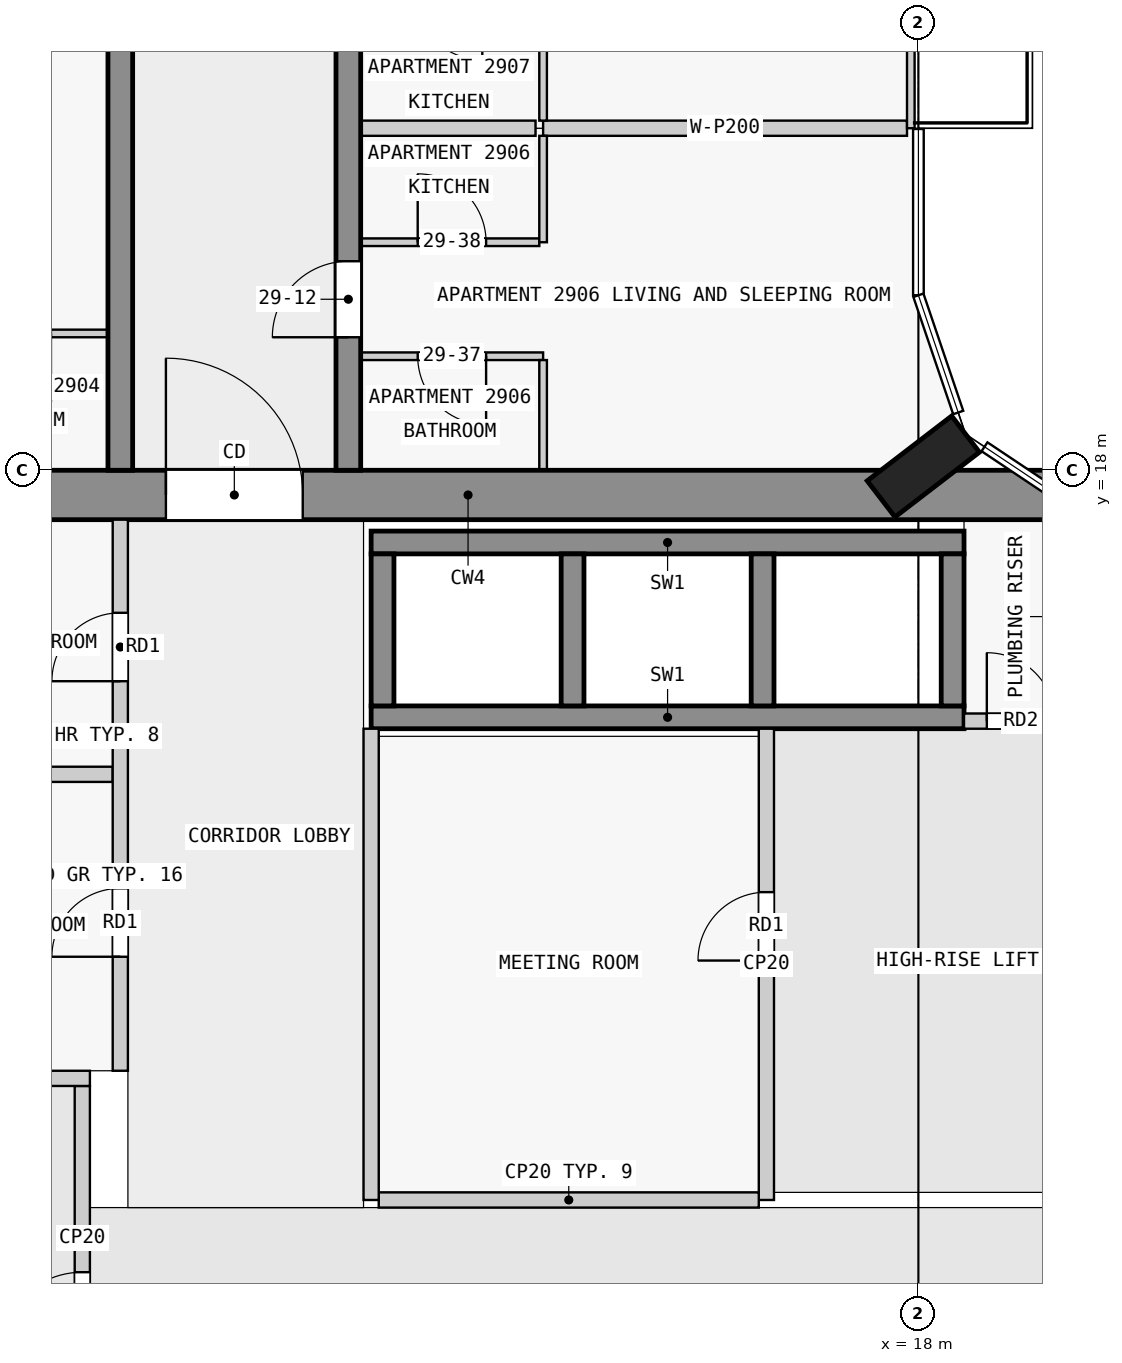
"""IFC4 building model, lengths in metres.
Left out: names, types, materials, properties, quantities, classifications, styles, units other than length and angle.
Written with IfcOpenShell. Run it as: python <this file> out.ifc"""

import sys

from ifc_helpers import new_model, si_unit, direction, frame, frame_2d, origin, origin_2d, place, context, subcontext, project, spatial, rectangle, extrude, element, fill, save


model = new_model("IFC4")
c1 = context("Model", 3, precision=1e-05, world=origin(), true_north=direction((0.0, 1.0)))
c2 = subcontext(c1, "Body", "Model", "MODEL_VIEW")
j1 = project(units=[si_unit("LENGTHUNIT", "METRE"), si_unit("PLANEANGLEUNIT", "RADIAN")], contexts=[c1])
p1 = place(None, origin())
s1 = spatial("IfcSite", under=j1, at=p1, CompositionType="ELEMENT")
p2 = place(p1, origin())
s2 = spatial("IfcBuilding", under=s1, at=p2, CompositionType="ELEMENT")
p3 = place(p2, frame((0.0, 0.0, 113.3)))
s3 = spatial("IfcBuildingStorey", under=s2, at=p3, CompositionType="ELEMENT", Elevation=113.3)
p4 = place(p3, frame((18.065, 18.05, 0.0), z_axis=(0.0, 0.0, 1.0), x_axis=(-0.608810846443, 0.793315418515, 0.0)))
e1 = element("IfcColumn", 1, at=p4, inside=s3, PredefinedType="COLUMN", context=c2, shape_type="SweptSolid", body=[
    extrude(rectangle(XDim=0.6, YDim=1.4, at=origin_2d()), origin(), (0.0, 0.0, 1.0), 3.5),
])
p5 = place(p3, frame((1.65, 17.675, 0.0), z_axis=(0.0, 0.0, 1.0), x_axis=(1.0, 0.0, 0.0)))
e2 = element("IfcWall", 2, at=p5, inside=s3, PredefinedType="SHEAR", context=c2, shape_type="SweptSolid", body=[
    extrude(rectangle(XDim=20.85, YDim=0.65, at=frame_2d((10.425, 0.0))), origin(), (0.0, 0.0, 1.0), 3.25),
])
p6 = place(p5, frame((6.45, 0.0, 0.0)))
e3 = element("IfcOpeningElement", 3, at=p6, cuts=e2, PredefinedType="OPENING", context=c2, shape_type="SweptSolid", body=[
    extrude(rectangle(XDim=1.8, YDim=2.1, at=frame_2d((0.9, 1.05))), frame((0.0, 0.335, 0.0), z_axis=(0.0, -1.0, 0.0), x_axis=(1.0, 0.0, 0.0)), (0.0, 0.0, 1.0), 0.67),
])
for number, where, z_axis, x_axis in (
    (4, (10.8, 17.05, 0.0), (0.0, 0.0, 1.0), (1.0, 0.0, 0.0)),
    (5, (10.8, 14.75, 0.0), (0.0, 0.0, 1.0), (1.0, 0.0, 0.0)),
):
    element("IfcWall", number, at=place(p3, frame(where, z_axis=z_axis, x_axis=x_axis)), inside=s3, PredefinedType="SHEAR", context=c2, shape_type="SweptSolid", body=[
        extrude(rectangle(XDim=7.8, YDim=0.3, at=frame_2d((3.9, 0.0))), origin(), (0.0, 0.0, 1.0), 3.25),
    ])
for number, where, z_axis, x_axis in (
    (6, (10.95, 14.9, 0.0), (0.0, 0.0, 1.0), (0.0, 1.0, 0.0)),
    (7, (13.45, 14.9, 0.0), (0.0, 0.0, 1.0), (0.0, 1.0, 0.0)),
    (8, (15.95, 14.9, 0.0), (0.0, 0.0, 1.0), (0.0, 1.0, 0.0)),
    (9, (18.45, 14.9, 0.0), (0.0, 0.0, 1.0), (0.0, 1.0, 0.0)),
):
    element("IfcWall", number, at=place(p3, frame(where, z_axis=z_axis, x_axis=x_axis)), inside=s3, PredefinedType="SHEAR", context=c2, shape_type="SweptSolid", body=[
        extrude(rectangle(XDim=2.0, YDim=0.3, at=frame_2d((1.0, 0.0))), origin(), (0.0, 0.0, 1.0), 3.25),
    ])
p7 = place(p3, frame((7.5, 18.0, 0.0), z_axis=(0.0, 0.0, 1.0), x_axis=(0.0, 1.0, 0.0)))
e10 = element("IfcWall", 10, at=p7, inside=s3, PredefinedType="SHEAR", context=c2, shape_type="SweptSolid", body=[
    extrude(rectangle(XDim=27.0, YDim=0.325, at=frame_2d((13.5, 0.0))), origin(), (0.0, 0.0, 1.0), 3.25),
])
p8 = place(p7, frame((5.65, 0.0, 0.0)))
e11 = element("IfcOpeningElement", 11, at=p8, cuts=e10, PredefinedType="OPENING", context=c2, shape_type="SweptSolid", body=[
    extrude(rectangle(XDim=1.0, YDim=2.1, at=frame_2d((0.5, 1.05))), frame((0.0, 0.172, 0.0), z_axis=(0.0, -1.0, 0.0), x_axis=(1.0, 0.0, 0.0)), (0.0, 0.0, 1.0), 0.345),
])
p9 = place(p7, frame((15.35, 0.0, 0.0)))
e12 = element("IfcOpeningElement", 12, at=p9, cuts=e10, PredefinedType="OPENING", context=c2, shape_type="SweptSolid", body=[
    extrude(rectangle(XDim=0.9, YDim=2.1, at=frame_2d((0.45, 1.05))), frame((0.0, 0.172, 0.0), z_axis=(0.0, -1.0, 0.0), x_axis=(1.0, 0.0, 0.0)), (0.0, 0.0, 1.0), 0.345),
])
p10 = place(p7, frame((21.35, 0.0, 0.0)))
e13 = element("IfcOpeningElement", 13, at=p10, cuts=e10, PredefinedType="OPENING", context=c2, shape_type="SweptSolid", body=[
    extrude(rectangle(XDim=1.0, YDim=2.1, at=frame_2d((0.5, 1.05))), frame((0.0, 0.172, 0.0), z_axis=(0.0, -1.0, 0.0), x_axis=(1.0, 0.0, 0.0)), (0.0, 0.0, 1.0), 0.345),
])
p11 = place(p3, frame((10.5, 18.0, 0.0), z_axis=(0.0, 0.0, 1.0), x_axis=(0.0, 1.0, 0.0)))
e14 = element("IfcWall", 14, at=p11, inside=s3, PredefinedType="SHEAR", context=c2, shape_type="SweptSolid", body=[
    extrude(rectangle(XDim=27.0, YDim=0.325, at=frame_2d((13.5, 0.0))), origin(), (0.0, 0.0, 1.0), 3.25),
])
p12 = place(p11, frame((1.75, 0.0, 0.0)))
e15 = element("IfcOpeningElement", 15, at=p12, cuts=e14, PredefinedType="OPENING", context=c2, shape_type="SweptSolid", body=[
    extrude(rectangle(XDim=1.0, YDim=2.1, at=frame_2d((0.5, 1.05))), frame((0.0, 0.172, 0.0), z_axis=(0.0, -1.0, 0.0), x_axis=(1.0, 0.0, 0.0)), (0.0, 0.0, 1.0), 0.345),
])
p13 = place(p11, frame((8.55, 0.0, 0.0)))
e16 = element("IfcOpeningElement", 16, at=p13, cuts=e14, PredefinedType="OPENING", context=c2, shape_type="SweptSolid", body=[
    extrude(rectangle(XDim=1.0, YDim=2.1, at=frame_2d((0.5, 1.05))), frame((0.0, 0.172, 0.0), z_axis=(0.0, -1.0, 0.0), x_axis=(1.0, 0.0, 0.0)), (0.0, 0.0, 1.0), 0.345),
])
p14 = place(p11, frame((15.35, 0.0, 0.0)))
e17 = element("IfcOpeningElement", 17, at=p14, cuts=e14, PredefinedType="OPENING", context=c2, shape_type="SweptSolid", body=[
    extrude(rectangle(XDim=0.9, YDim=2.1, at=frame_2d((0.45, 1.05))), frame((0.0, 0.172, 0.0), z_axis=(0.0, -1.0, 0.0), x_axis=(1.0, 0.0, 0.0)), (0.0, 0.0, 1.0), 0.345),
])
p15 = place(p11, frame((19.75, 0.0, 0.0)))
e18 = element("IfcOpeningElement", 18, at=p15, cuts=e14, PredefinedType="OPENING", context=c2, shape_type="SweptSolid", body=[
    extrude(rectangle(XDim=1.0, YDim=2.1, at=frame_2d((0.5, 1.05))), frame((0.0, 0.172, 0.0), z_axis=(0.0, -1.0, 0.0), x_axis=(1.0, 0.0, 0.0)), (0.0, 0.0, 1.0), 0.345),
])
p16 = place(p11, frame((23.25, 0.0, 0.0)))
e19 = element("IfcOpeningElement", 19, at=p16, cuts=e14, PredefinedType="OPENING", context=c2, shape_type="SweptSolid", body=[
    extrude(rectangle(XDim=0.9, YDim=2.1, at=frame_2d((0.45, 1.05))), frame((0.0, 0.172, 0.0), z_axis=(0.0, -1.0, 0.0), x_axis=(1.0, 0.0, 0.0)), (0.0, 0.0, 1.0), 0.345),
])
p17 = place(p11, frame((25.45, 0.0, 0.0)))
e20 = element("IfcOpeningElement", 20, at=p17, cuts=e14, PredefinedType="OPENING", context=c2, shape_type="SweptSolid", body=[
    extrude(rectangle(XDim=1.0, YDim=2.1, at=frame_2d((0.5, 1.05))), frame((0.0, 0.172, 0.0), z_axis=(0.0, -1.0, 0.0), x_axis=(1.0, 0.0, 0.0)), (0.0, 0.0, 1.0), 0.345),
])
p18 = place(p3, frame((17.9, 27.0, 0.0), z_axis=(0.0, 0.0, 1.0), x_axis=(0.0, -1.0, 0.0)))
e21 = element("IfcWall", 21, at=p18, inside=s3, PredefinedType="STANDARD", context=c2, shape_type="SweptSolid", body=[
    extrude(rectangle(XDim=4.5, YDim=0.1, at=frame_2d((2.25, 0.0))), origin(), (0.0, 0.0, 1.0), 3.25),
])
p19 = place(p18, frame((1.05, 0.0, 0.0)))
e22 = element("IfcOpeningElement", 22, at=p19, cuts=e21, PredefinedType="OPENING", context=c2, shape_type="SweptSolid", body=[
    extrude(rectangle(XDim=2.4, YDim=2.4, at=frame_2d((1.2, 1.2))), frame((0.0, 0.06, 0.0), z_axis=(0.0, -1.0, 0.0), x_axis=(1.0, 0.0, 0.0)), (0.0, 0.0, 1.0), 0.12),
])
p20 = place(p3, frame((7.0, 5.9, 0.0), z_axis=(0.0, 0.0, 1.0), x_axis=(0.0, 1.0, 0.0)))
e23 = element("IfcWall", 23, at=p20, inside=s3, PredefinedType="PARTITIONING", context=c2, shape_type="SweptSolid", body=[
    extrude(rectangle(XDim=4.0, YDim=0.2, at=frame_2d((2.0, 0.0))), origin(), (0.0, 0.0, 1.0), 3.25),
])
p21 = place(p20, frame((0.45, 0.0, 0.0)))
e24 = element("IfcOpeningElement", 24, at=p21, cuts=e23, PredefinedType="OPENING", context=c2, shape_type="SweptSolid", body=[
    extrude(rectangle(XDim=1.1, YDim=2.1, at=frame_2d((0.55, 1.05))), frame((0.0, 0.11, 0.0), z_axis=(0.0, -1.0, 0.0), x_axis=(1.0, 0.0, 0.0)), (0.0, 0.0, 1.0), 0.22),
])
p22 = place(p3, frame((5.15, 10.0, 0.0), z_axis=(0.0, 0.0, 1.0), x_axis=(1.0, 0.0, 0.0)))
e25 = element("IfcWall", 25, at=p22, inside=s3, PredefinedType="PARTITIONING", context=c2, shape_type="SweptSolid", body=[
    extrude(rectangle(XDim=1.95, YDim=0.2, at=frame_2d((0.975, 0.0))), origin(), (0.0, 0.0, 1.0), 3.25),
])
p23 = place(p3, frame((10.8, 8.4, 0.0), z_axis=(0.0, 0.0, 1.0), x_axis=(0.0, 1.0, 0.0)))
e26 = element("IfcWall", 26, at=p23, inside=s3, PredefinedType="PARTITIONING", context=c2, shape_type="SweptSolid", body=[
    extrude(rectangle(XDim=6.2, YDim=0.2, at=frame_2d((3.1, 0.0))), origin(), (0.0, 0.0, 1.0), 3.25),
])
p24 = place(p3, frame((10.9, 8.4, 0.0), z_axis=(0.0, 0.0, 1.0), x_axis=(1.0, 0.0, 0.0)))
e27 = element("IfcWall", 27, at=p24, inside=s3, PredefinedType="PARTITIONING", context=c2, shape_type="SweptSolid", body=[
    extrude(rectangle(XDim=5.0, YDim=0.2, at=frame_2d((2.5, 0.0))), origin(), (0.0, 0.0, 1.0), 3.25),
])
p25 = place(p3, frame((16.0, 8.4, 0.0), z_axis=(0.0, 0.0, 1.0), x_axis=(0.0, 1.0, 0.0)))
e28 = element("IfcWall", 28, at=p25, inside=s3, PredefinedType="PARTITIONING", context=c2, shape_type="SweptSolid", body=[
    extrude(rectangle(XDim=6.2, YDim=0.2, at=frame_2d((3.1, 0.0))), origin(), (0.0, 0.0, 1.0), 3.25),
])
p26 = place(p25, frame((3.15, 0.0, 0.0)))
e29 = element("IfcOpeningElement", 29, at=p26, cuts=e28, PredefinedType="OPENING", context=c2, shape_type="SweptSolid", body=[
    extrude(rectangle(XDim=0.9, YDim=2.1, at=frame_2d((0.45, 1.05))), frame((0.0, 0.11, 0.0), z_axis=(0.0, -1.0, 0.0), x_axis=(1.0, 0.0, 0.0)), (0.0, 0.0, 1.0), 0.22),
])
p27 = place(p3, frame((7.5, 10.1, 0.0), z_axis=(0.0, 0.0, 1.0), x_axis=(0.0, 1.0, 0.0)))
e30 = element("IfcWall", 30, at=p27, inside=s3, PredefinedType="PARTITIONING", context=c2, shape_type="SweptSolid", body=[
    extrude(rectangle(XDim=7.25, YDim=0.2, at=frame_2d((3.625, 0.0))), origin(), (0.0, 0.0, 1.0), 3.25),
])
p28 = place(p27, frame((1.5, 0.0, 0.0)))
e31 = element("IfcOpeningElement", 31, at=p28, cuts=e30, PredefinedType="OPENING", context=c2, shape_type="SweptSolid", body=[
    extrude(rectangle(XDim=0.9, YDim=2.1, at=frame_2d((0.45, 1.05))), frame((0.0, 0.11, 0.0), z_axis=(0.0, -1.0, 0.0), x_axis=(1.0, 0.0, 0.0)), (0.0, 0.0, 1.0), 0.22),
])
p29 = place(p27, frame((5.125, 0.0, 0.0)))
e32 = element("IfcOpeningElement", 32, at=p29, cuts=e30, PredefinedType="OPENING", context=c2, shape_type="SweptSolid", body=[
    extrude(rectangle(XDim=0.9, YDim=2.1, at=frame_2d((0.45, 1.05))), frame((0.0, 0.11, 0.0), z_axis=(0.0, -1.0, 0.0), x_axis=(1.0, 0.0, 0.0)), (0.0, 0.0, 1.0), 0.22),
])
p30 = place(p3, frame((5.15, 14.0, 0.0), z_axis=(0.0, 0.0, 1.0), x_axis=(1.0, 0.0, 0.0)))
e33 = element("IfcWall", 33, at=p30, inside=s3, PredefinedType="PARTITIONING", context=c2, shape_type="SweptSolid", body=[
    extrude(rectangle(XDim=2.25, YDim=0.2, at=frame_2d((1.125, 0.0))), origin(), (0.0, 0.0, 1.0), 3.25),
])
p31 = place(p3, frame((18.6, 14.7, 0.0), z_axis=(0.0, 0.0, 1.0), x_axis=(1.0, 0.0, 0.0)))
e34 = element("IfcWall", 34, at=p31, inside=s3, PredefinedType="PARTITIONING", context=c2, shape_type="SweptSolid", body=[
    extrude(rectangle(XDim=3.25, YDim=0.2, at=frame_2d((1.625, 0.0))), origin(), (0.0, 0.0, 1.0), 3.25),
])
p32 = place(p31, frame((0.3, 0.0, 0.0)))
e35 = element("IfcOpeningElement", 35, at=p32, cuts=e34, PredefinedType="OPENING", context=c2, shape_type="SweptSolid", body=[
    extrude(rectangle(XDim=0.9, YDim=2.1, at=frame_2d((0.45, 1.05))), frame((0.0, 0.11, 0.0), z_axis=(0.0, -1.0, 0.0), x_axis=(1.0, 0.0, 0.0)), (0.0, 0.0, 1.0), 0.22),
])
p33 = place(p31, frame((1.925, 0.0, 0.0)))
e36 = element("IfcOpeningElement", 36, at=p33, cuts=e34, PredefinedType="OPENING", context=c2, shape_type="SweptSolid", body=[
    extrude(rectangle(XDim=0.9, YDim=2.1, at=frame_2d((0.45, 1.05))), frame((0.0, 0.11, 0.0), z_axis=(0.0, -1.0, 0.0), x_axis=(1.0, 0.0, 0.0)), (0.0, 0.0, 1.0), 0.22),
])
p34 = place(p3, frame((13.062, 19.5, 0.0), z_axis=(0.0, 0.0, 1.0), x_axis=(-1.0, 0.0, 0.0)))
e37 = element("IfcWall", 37, at=p34, inside=s3, PredefinedType="PARTITIONING", context=c2, shape_type="SweptSolid", body=[
    extrude(rectangle(XDim=2.4, YDim=0.1, at=frame_2d((1.2, 0.0))), origin(), (0.0, 0.0, 1.0), 3.25),
])
p35 = place(p34, frame((0.75, 0.0, 0.0)))
e38 = element("IfcOpeningElement", 38, at=p35, cuts=e37, PredefinedType="OPENING", context=c2, shape_type="SweptSolid", body=[
    extrude(rectangle(XDim=0.9, YDim=2.1, at=frame_2d((0.45, 1.05))), frame((0.0, 0.06, 0.0), z_axis=(0.0, -1.0, 0.0), x_axis=(1.0, 0.0, 0.0)), (0.0, 0.0, 1.0), 0.12),
])
p36 = place(p3, frame((7.337, 19.8, 0.0), z_axis=(0.0, 0.0, 1.0), x_axis=(-1.0, 0.0, 0.0)))
e39 = element("IfcWall", 39, at=p36, inside=s3, PredefinedType="PARTITIONING", context=c2, shape_type="SweptSolid", body=[
    extrude(rectangle(XDim=2.35, YDim=0.1, at=frame_2d((1.175, 0.0))), origin(), (0.0, 0.0, 1.0), 3.25),
])
p37 = place(p36, frame((0.75, 0.0, 0.0)))
e40 = element("IfcOpeningElement", 40, at=p37, cuts=e39, PredefinedType="OPENING", context=c2, shape_type="SweptSolid", body=[
    extrude(rectangle(XDim=0.9, YDim=2.1, at=frame_2d((0.45, 1.05))), frame((0.0, 0.06, 0.0), z_axis=(0.0, -1.0, 0.0), x_axis=(1.0, 0.0, 0.0)), (0.0, 0.0, 1.0), 0.12),
])
p38 = place(p3, frame((10.663, 21.0, 0.0), z_axis=(0.0, 0.0, 1.0), x_axis=(1.0, 0.0, 0.0)))
e41 = element("IfcWall", 41, at=p38, inside=s3, PredefinedType="PARTITIONING", context=c2, shape_type="SweptSolid", body=[
    extrude(rectangle(XDim=2.35, YDim=0.1, at=frame_2d((1.175, 0.0))), origin(), (0.0, 0.0, 1.0), 3.25),
])
p39 = place(p38, frame((0.75, 0.0, 0.0)))
e42 = element("IfcOpeningElement", 42, at=p39, cuts=e41, PredefinedType="OPENING", context=c2, shape_type="SweptSolid", body=[
    extrude(rectangle(XDim=0.9, YDim=2.1, at=frame_2d((0.45, 1.05))), frame((0.0, 0.06, 0.0), z_axis=(0.0, -1.0, 0.0), x_axis=(1.0, 0.0, 0.0)), (0.0, 0.0, 1.0), 0.12),
])
p40 = place(p3, frame((12.962, 22.5, 0.0), z_axis=(0.0, 0.0, 1.0), x_axis=(-1.0, 0.0, 0.0)))
e43 = element("IfcWall", 43, at=p40, inside=s3, PredefinedType="PARTITIONING", context=c2, shape_type="SweptSolid", body=[
    extrude(rectangle(XDim=2.3, YDim=0.2, at=frame_2d((1.15, 0.0))), origin(), (0.0, 0.0, 1.0), 3.25),
])
p41 = place(p3, frame((13.062, 22.5, 0.0), z_axis=(0.0, 0.0, 1.0), x_axis=(1.0, 0.0, 0.0)))
e44 = element("IfcWall", 44, at=p41, inside=s3, PredefinedType="PARTITIONING", context=c2, shape_type="SweptSolid", body=[
    extrude(rectangle(XDim=4.788, YDim=0.2, at=frame_2d((2.394, 0.0))), origin(), (0.0, 0.0, 1.0), 3.25),
])
p42 = place(p3, frame((13.062, 18.0, 0.0), z_axis=(0.0, 0.0, 1.0), x_axis=(0.0, 1.0, 0.0)))
e45 = element("IfcWall", 45, at=p42, inside=s3, PredefinedType="PARTITIONING", context=c2, shape_type="SweptSolid", body=[
    extrude(rectangle(XDim=1.45, YDim=0.1, at=frame_2d((0.725, 0.0))), origin(), (0.0, 0.0, 1.0), 3.25),
])
p43 = place(p3, frame((13.062, 21.0, 0.0), z_axis=(0.0, 0.0, 1.0), x_axis=(0.0, 1.0, 0.0)))
e46 = element("IfcWall", 46, at=p43, inside=s3, PredefinedType="PARTITIONING", context=c2, shape_type="SweptSolid", body=[
    extrude(rectangle(XDim=1.4, YDim=0.1, at=frame_2d((0.7, 0.0))), origin(), (0.0, 0.0, 1.0), 3.25),
])
p44 = place(p3, frame((13.062, 22.6, 0.0), z_axis=(0.0, 0.0, 1.0), x_axis=(0.0, 1.0, 0.0)))
e47 = element("IfcWall", 47, at=p44, inside=s3, PredefinedType="PARTITIONING", context=c2, shape_type="SweptSolid", body=[
    extrude(rectangle(XDim=1.7, YDim=0.1, at=frame_2d((0.85, 0.0))), origin(), (0.0, 0.0, 1.0), 3.25),
])
p45 = place(p21, origin())
e48 = element("IfcDoor", 48, at=p45, inside=s3, OperationType="SINGLE_SWING_LEFT", PredefinedType="DOOR", context=c2, shape_type="SweptSolid", body=[
    extrude(rectangle(XDim=1.1, YDim=2.1, at=frame_2d((0.55, 1.05))), frame((0.0, 0.025, 0.0), z_axis=(0.0, -1.0, 0.0), x_axis=(1.0, 0.0, 0.0)), (0.0, 0.0, 1.0), 0.05),
])
fill(e24, e48)
p46 = place(p26, origin())
e49 = element("IfcDoor", 49, at=p46, inside=s3, OperationType="SINGLE_SWING_LEFT", PredefinedType="DOOR", context=c2, shape_type="SweptSolid", body=[
    extrude(rectangle(XDim=0.9, YDim=2.1, at=frame_2d((0.45, 1.05))), frame((0.0, 0.025, 0.0), z_axis=(0.0, -1.0, 0.0), x_axis=(1.0, 0.0, 0.0)), (0.0, 0.0, 1.0), 0.05),
])
fill(e29, e49)
p47 = place(p6, origin())
e50 = element("IfcDoor", 50, at=p47, inside=s3, OperationType="DOUBLE_DOOR_SINGLE_SWING", PredefinedType="DOOR", context=c2, shape_type="SweptSolid", body=[
    extrude(rectangle(XDim=1.8, YDim=2.1, at=frame_2d((0.9, 1.05))), frame((0.0, 0.025, 0.0), z_axis=(0.0, -1.0, 0.0), x_axis=(1.0, 0.0, 0.0)), (0.0, 0.0, 1.0), 0.05),
])
fill(e3, e50)
p48 = place(p28, origin())
e51 = element("IfcDoor", 51, at=p48, inside=s3, OperationType="SINGLE_SWING_RIGHT", PredefinedType="DOOR", context=c2, shape_type="SweptSolid", body=[
    extrude(rectangle(XDim=0.9, YDim=2.1, at=frame_2d((0.45, 1.05))), frame((0.0, 0.025, 0.0), z_axis=(0.0, -1.0, 0.0), x_axis=(1.0, 0.0, 0.0)), (0.0, 0.0, 1.0), 0.05),
])
fill(e31, e51)
p49 = place(p29, origin())
e52 = element("IfcDoor", 52, at=p49, inside=s3, OperationType="SINGLE_SWING_RIGHT", PredefinedType="DOOR", context=c2, shape_type="SweptSolid", body=[
    extrude(rectangle(XDim=0.9, YDim=2.1, at=frame_2d((0.45, 1.05))), frame((0.0, 0.025, 0.0), z_axis=(0.0, -1.0, 0.0), x_axis=(1.0, 0.0, 0.0)), (0.0, 0.0, 1.0), 0.05),
])
fill(e32, e52)
p50 = place(p32, origin())
e53 = element("IfcDoor", 53, at=p50, inside=s3, OperationType="SINGLE_SWING_LEFT", PredefinedType="DOOR", context=c2, shape_type="SweptSolid", body=[
    extrude(rectangle(XDim=0.9, YDim=2.1, at=frame_2d((0.45, 1.05))), frame((0.0, 0.025, 0.0), z_axis=(0.0, -1.0, 0.0), x_axis=(1.0, 0.0, 0.0)), (0.0, 0.0, 1.0), 0.05),
])
fill(e35, e53)
p51 = place(p12, origin())
e54 = element("IfcDoor", 54, at=p51, inside=s3, OperationType="SINGLE_SWING_LEFT", PredefinedType="DOOR", context=c2, shape_type="SweptSolid", body=[
    extrude(rectangle(XDim=1.0, YDim=2.1, at=frame_2d((0.5, 1.05))), frame((0.0, 0.025, 0.0), z_axis=(0.0, -1.0, 0.0), x_axis=(1.0, 0.0, 0.0)), (0.0, 0.0, 1.0), 0.05),
])
fill(e15, e54)
p52 = place(p35, origin())
e55 = element("IfcDoor", 55, at=p52, inside=s3, OperationType="SINGLE_SWING_LEFT", PredefinedType="DOOR", context=c2, shape_type="SweptSolid", body=[
    extrude(rectangle(XDim=0.9, YDim=2.1, at=frame_2d((0.45, 1.05))), frame((0.0, 0.025, 0.0), z_axis=(0.0, -1.0, 0.0), x_axis=(1.0, 0.0, 0.0)), (0.0, 0.0, 1.0), 0.05),
])
fill(e38, e55)
p53 = place(p39, origin())
e56 = element("IfcDoor", 56, at=p53, inside=s3, OperationType="SINGLE_SWING_RIGHT", PredefinedType="DOOR", context=c2, shape_type="SweptSolid", body=[
    extrude(rectangle(XDim=0.9, YDim=2.1, at=frame_2d((0.45, 1.05))), frame((0.0, 0.025, 0.0), z_axis=(0.0, -1.0, 0.0), x_axis=(1.0, 0.0, 0.0)), (0.0, 0.0, 1.0), 0.05),
])
fill(e42, e56)
save(model, sys.argv[1])
